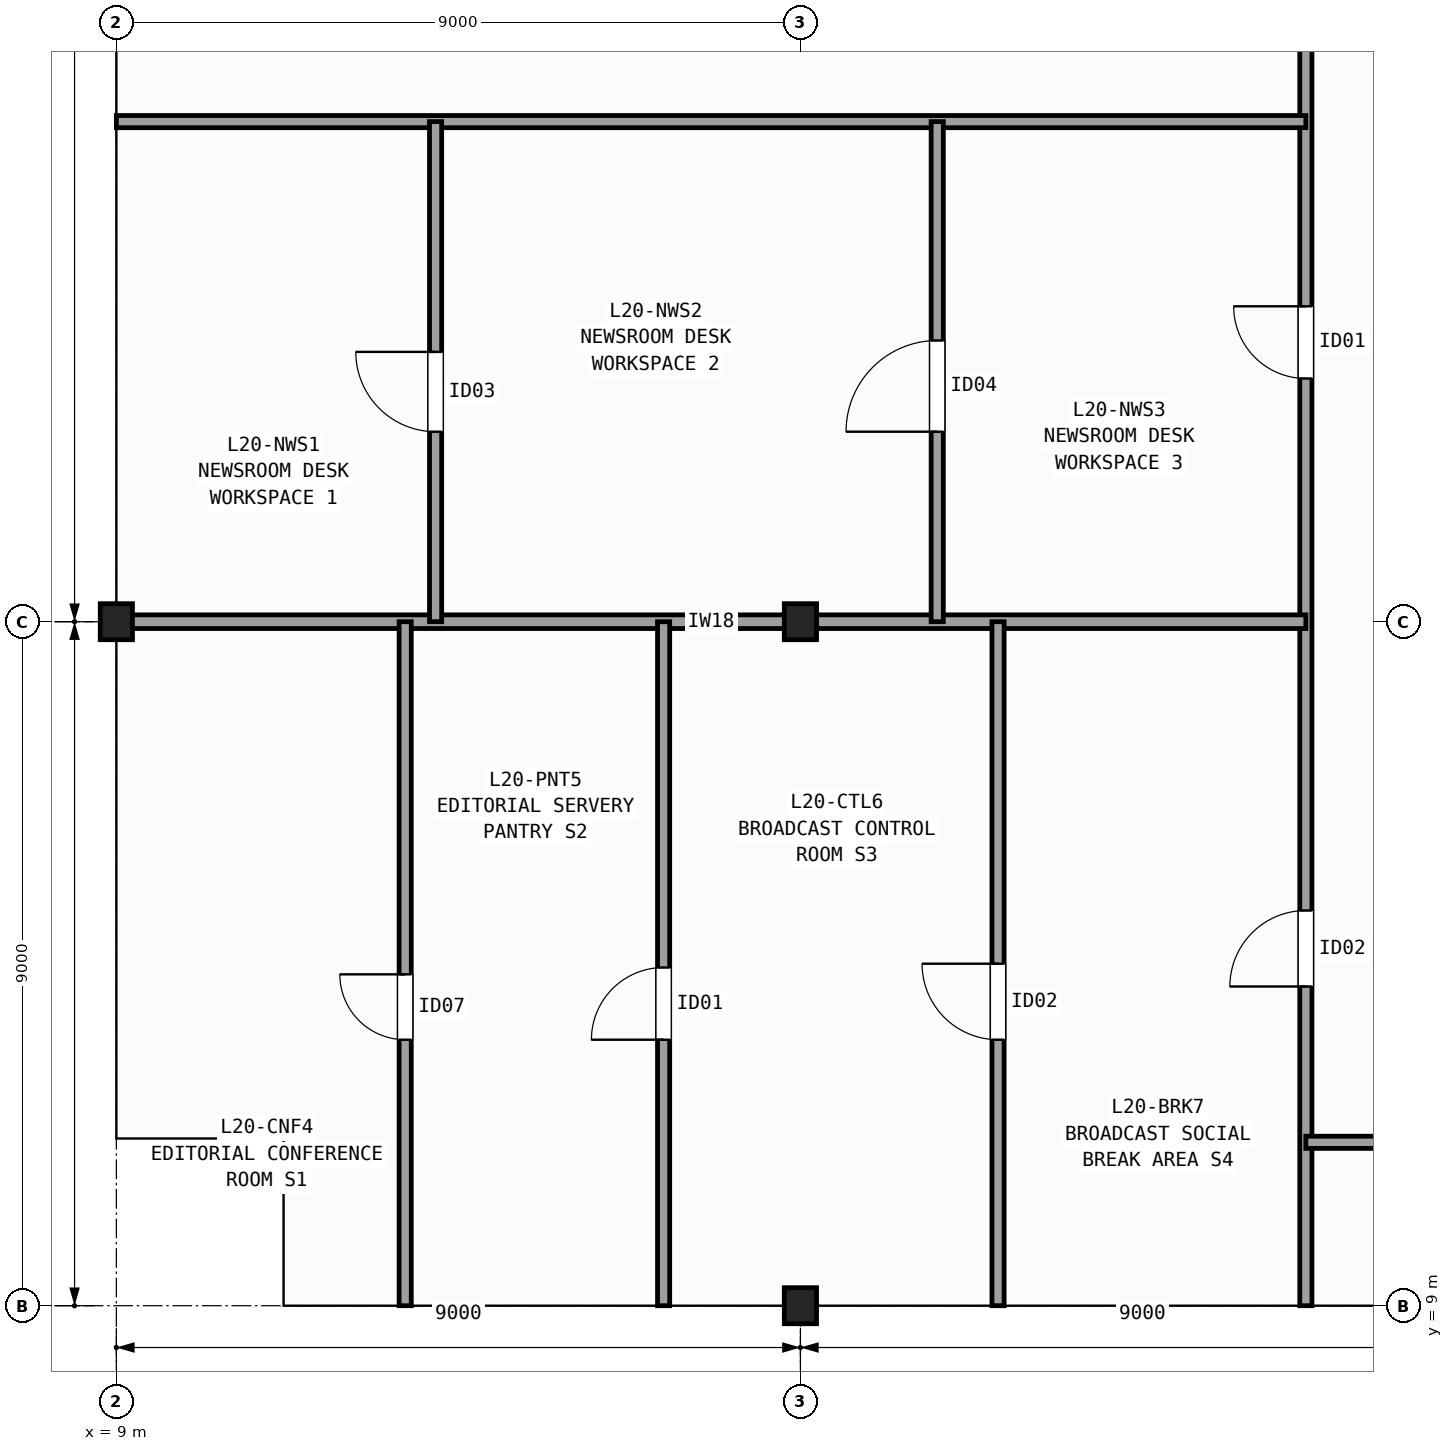
"""IFC4 building model, lengths in metres.
Left out: names, types, materials, properties, quantities, classifications, styles, units other than length and angle.
Written with IfcOpenShell. Run it as: python <this file> out.ifc"""

import sys

from ifc_helpers import new_model, si_unit, direction, frame, frame_2d, origin, origin_2d, place, context, subcontext, project, spatial, rectangle, i_section, extrude, element, fill, save


model = new_model("IFC4")
c1 = context("Model", 3, precision=1e-05, world=origin(), true_north=direction((0.0, 1.0)))
c2 = subcontext(c1, "Body", "Model", "MODEL_VIEW")
j1 = project(units=[si_unit("LENGTHUNIT", "METRE"), si_unit("PLANEANGLEUNIT", "RADIAN")], contexts=[c1])
p1 = place(None, origin())
s1 = spatial("IfcSite", under=j1, at=p1, CompositionType="ELEMENT")
p2 = place(p1, origin())
s2 = spatial("IfcBuilding", under=s1, at=p2, CompositionType="ELEMENT")
p3 = place(p2, frame((0.0, 0.0, 84.1)))
s3 = spatial("IfcBuildingStorey", under=s2, at=p3, CompositionType="ELEMENT", Elevation=84.1)
for number, where, z_axis, x_axis in (
    (1, (9.0, 18.0, 0.0), (0.0, 0.0, 1.0), (1.0, 0.0, 0.0)),
    (2, (18.0, 9.0, 0.0), (0.0, 0.0, 1.0), (1.0, 0.0, 0.0)),
    (3, (18.0, 18.0, 0.0), (0.0, 0.0, 1.0), (1.0, 0.0, 0.0)),
):
    element("IfcColumn", number, at=place(p3, frame(where, z_axis=z_axis, x_axis=x_axis)), inside=s3, PredefinedType="COLUMN", context=c2, shape_type="SweptSolid", body=[
        extrude(i_section(OverallWidth=0.424, OverallDepth=0.474, WebThickness=0.048, FlangeThickness=0.077, FilletRadius=0.015, at=origin_2d()), origin(), (0.0, 0.0, 1.0), 5.0),
    ])
p4 = place(p3, frame((24.65, 9.0, 0.0), z_axis=(0.0, 0.0, 1.0), x_axis=(0.0, 1.0, 0.0)))
e4 = element("IfcWall", 4, at=p4, inside=s3, PredefinedType="PARTITIONING", context=c2, shape_type="SweptSolid", body=[
    extrude(rectangle(XDim=19.2, YDim=0.16, at=frame_2d((9.6, 0.0))), origin(), (0.0, 0.0, 1.0), 3.927),
])
p5 = place(p4, frame((12.2, 0.0, 0.0)))
e5 = element("IfcOpeningElement", 5, at=p5, cuts=e4, PredefinedType="OPENING", context=c2, shape_type="SweptSolid", body=[
    extrude(rectangle(XDim=0.95, YDim=2.1, at=frame_2d((0.475, 1.05))), frame((0.0, 0.09, 0.0), z_axis=(0.0, -1.0, 0.0), x_axis=(1.0, 0.0, 0.0)), (0.0, 0.0, 1.0), 0.18),
])
p6 = place(p4, frame((4.2, 0.0, 0.0)))
e6 = element("IfcOpeningElement", 6, at=p6, cuts=e4, PredefinedType="OPENING", context=c2, shape_type="SweptSolid", body=[
    extrude(rectangle(XDim=1.0, YDim=2.1, at=frame_2d((0.5, 1.05))), frame((0.0, 0.09, 0.0), z_axis=(0.0, -1.0, 0.0), x_axis=(1.0, 0.0, 0.0)), (0.0, 0.0, 1.0), 0.18),
])
p7 = place(p3, frame((9.0, 24.58, 0.0), z_axis=(0.0, 0.0, 1.0), x_axis=(1.0, 0.0, 0.0)))
e7 = element("IfcWall", 7, at=p7, inside=s3, PredefinedType="PARTITIONING", context=c2, shape_type="SweptSolid", body=[
    extrude(rectangle(XDim=15.65, YDim=0.16, at=frame_2d((7.825, 0.0))), origin(), (0.0, 0.0, 1.0), 3.927),
])
p8 = place(p3, frame((9.0, 18.0, 0.0), z_axis=(0.0, 0.0, 1.0), x_axis=(1.0, 0.0, 0.0)))
e8 = element("IfcWall", 8, at=p8, inside=s3, PredefinedType="PARTITIONING", context=c2, shape_type="SweptSolid", body=[
    extrude(rectangle(XDim=15.65, YDim=0.18, at=frame_2d((7.825, 0.0))), origin(), (0.0, 0.0, 1.0), 3.927),
])
p9 = place(p3, frame((13.2, 18.0, 0.0), z_axis=(0.0, 0.0, 1.0), x_axis=(0.0, 1.0, 0.0)))
e9 = element("IfcWall", 9, at=p9, inside=s3, PredefinedType="PARTITIONING", context=c2, shape_type="SweptSolid", body=[
    extrude(rectangle(XDim=6.58, YDim=0.16, at=frame_2d((3.29, 0.0))), origin(), (0.0, 0.0, 1.0), 4.089),
])
p10 = place(p9, frame((2.5, 0.0, 0.0)))
e10 = element("IfcOpeningElement", 10, at=p10, cuts=e9, PredefinedType="OPENING", context=c2, shape_type="SweptSolid", body=[
    extrude(rectangle(XDim=1.05, YDim=2.15, at=frame_2d((0.525, 1.075))), frame((0.0, 0.09, 0.0), z_axis=(0.0, -1.0, 0.0), x_axis=(1.0, 0.0, 0.0)), (0.0, 0.0, 1.0), 0.18),
])
p11 = place(p3, frame((19.8, 18.0, 0.0), z_axis=(0.0, 0.0, 1.0), x_axis=(0.0, 1.0, 0.0)))
e11 = element("IfcWall", 11, at=p11, inside=s3, PredefinedType="PARTITIONING", context=c2, shape_type="SweptSolid", body=[
    extrude(rectangle(XDim=6.58, YDim=0.16, at=frame_2d((3.29, 0.0))), origin(), (0.0, 0.0, 1.0), 4.089),
])
p12 = place(p11, frame((2.5, 0.0, 0.0)))
e12 = element("IfcOpeningElement", 12, at=p12, cuts=e11, PredefinedType="OPENING", context=c2, shape_type="SweptSolid", body=[
    extrude(rectangle(XDim=1.2, YDim=2.15, at=frame_2d((0.6, 1.075))), frame((0.0, 0.09, 0.0), z_axis=(0.0, -1.0, 0.0), x_axis=(1.0, 0.0, 0.0)), (0.0, 0.0, 1.0), 0.18),
])
p13 = place(p3, frame((12.8, 9.0, 0.0), z_axis=(0.0, 0.0, 1.0), x_axis=(0.0, 1.0, 0.0)))
e13 = element("IfcWall", 13, at=p13, inside=s3, PredefinedType="PARTITIONING", context=c2, shape_type="SweptSolid", body=[
    extrude(rectangle(XDim=9.0, YDim=0.16, at=frame_2d((4.5, 0.0))), origin(), (0.0, 0.0, 1.0), 4.089),
])
p14 = place(p13, frame((3.5, 0.0, 0.0)))
e14 = element("IfcOpeningElement", 14, at=p14, cuts=e13, PredefinedType="OPENING", context=c2, shape_type="SweptSolid", body=[
    extrude(rectangle(XDim=0.86, YDim=2.05, at=frame_2d((0.43, 1.025))), frame((0.0, 0.09, 0.0), z_axis=(0.0, -1.0, 0.0), x_axis=(1.0, 0.0, 0.0)), (0.0, 0.0, 1.0), 0.18),
])
p15 = place(p3, frame((16.2, 9.0, 0.0), z_axis=(0.0, 0.0, 1.0), x_axis=(0.0, 1.0, 0.0)))
e15 = element("IfcWall", 15, at=p15, inside=s3, PredefinedType="PARTITIONING", context=c2, shape_type="SweptSolid", body=[
    extrude(rectangle(XDim=9.0, YDim=0.16, at=frame_2d((4.5, 0.0))), origin(), (0.0, 0.0, 1.0), 4.089),
])
p16 = place(p15, frame((3.5, 0.0, 0.0)))
e16 = element("IfcOpeningElement", 16, at=p16, cuts=e15, PredefinedType="OPENING", context=c2, shape_type="SweptSolid", body=[
    extrude(rectangle(XDim=0.95, YDim=2.1, at=frame_2d((0.475, 1.05))), frame((0.0, 0.09, 0.0), z_axis=(0.0, -1.0, 0.0), x_axis=(1.0, 0.0, 0.0)), (0.0, 0.0, 1.0), 0.18),
])
p17 = place(p3, frame((20.6, 9.0, 0.0), z_axis=(0.0, 0.0, 1.0), x_axis=(0.0, 1.0, 0.0)))
e17 = element("IfcWall", 17, at=p17, inside=s3, PredefinedType="PARTITIONING", context=c2, shape_type="SweptSolid", body=[
    extrude(rectangle(XDim=9.0, YDim=0.16, at=frame_2d((4.5, 0.0))), origin(), (0.0, 0.0, 1.0), 3.927),
])
p18 = place(p17, frame((3.5, 0.0, 0.0)))
e18 = element("IfcOpeningElement", 18, at=p18, cuts=e17, PredefinedType="OPENING", context=c2, shape_type="SweptSolid", body=[
    extrude(rectangle(XDim=1.0, YDim=2.1, at=frame_2d((0.5, 1.05))), frame((0.0, 0.09, 0.0), z_axis=(0.0, -1.0, 0.0), x_axis=(1.0, 0.0, 0.0)), (0.0, 0.0, 1.0), 0.18),
])
p19 = place(p3, frame((24.65, 11.15, 0.0), z_axis=(0.0, 0.0, 1.0), x_axis=(1.0, 0.0, 0.0)))
e19 = element("IfcWall", 19, at=p19, inside=s3, PredefinedType="PARTITIONING", context=c2, shape_type="SweptSolid", body=[
    extrude(rectangle(XDim=4.75, YDim=0.16, at=frame_2d((2.375, 0.0))), origin(), (0.0, 0.0, 1.0), 4.092),
])
p20 = place(p19, frame((1.2, 0.0, 0.0)))
e20 = element("IfcOpeningElement", 20, at=p20, cuts=e19, PredefinedType="OPENING", context=c2, shape_type="SweptSolid", body=[
    extrude(rectangle(XDim=0.95, YDim=2.1, at=frame_2d((0.475, 1.05))), frame((0.0, 0.09, 0.0), z_axis=(0.0, -1.0, 0.0), x_axis=(1.0, 0.0, 0.0)), (0.0, 0.0, 1.0), 0.18),
])
p21 = place(p5, origin())
e21 = element("IfcDoor", 21, at=p21, inside=s3, OperationType="SINGLE_SWING_RIGHT", PredefinedType="DOOR", context=c2, shape_type="SweptSolid", body=[
    extrude(rectangle(XDim=0.95, YDim=2.1, at=frame_2d((0.475, 1.05))), frame((0.0, 0.025, 0.0), z_axis=(0.0, -1.0, 0.0), x_axis=(1.0, 0.0, 0.0)), (0.0, 0.0, 1.0), 0.05),
])
fill(e5, e21)
p22 = place(p6, origin())
e22 = element("IfcDoor", 22, at=p22, inside=s3, OperationType="SINGLE_SWING_LEFT", PredefinedType="DOOR", context=c2, shape_type="SweptSolid", body=[
    extrude(rectangle(XDim=1.0, YDim=2.1, at=frame_2d((0.5, 1.05))), frame((0.0, 0.025, 0.0), z_axis=(0.0, -1.0, 0.0), x_axis=(1.0, 0.0, 0.0)), (0.0, 0.0, 1.0), 0.05),
])
fill(e6, e22)
p23 = place(p10, origin())
e23 = element("IfcDoor", 23, at=p23, inside=s3, OperationType="SINGLE_SWING_RIGHT", PredefinedType="DOOR", context=c2, shape_type="SweptSolid", body=[
    extrude(rectangle(XDim=1.05, YDim=2.15, at=frame_2d((0.525, 1.075))), frame((0.0, 0.025, 0.0), z_axis=(0.0, -1.0, 0.0), x_axis=(1.0, 0.0, 0.0)), (0.0, 0.0, 1.0), 0.05),
])
fill(e10, e23)
p24 = place(p12, origin())
e24 = element("IfcDoor", 24, at=p24, inside=s3, OperationType="SINGLE_SWING_LEFT", PredefinedType="DOOR", context=c2, shape_type="SweptSolid", body=[
    extrude(rectangle(XDim=1.2, YDim=2.15, at=frame_2d((0.6, 1.075))), frame((0.0, 0.025, 0.0), z_axis=(0.0, -1.0, 0.0), x_axis=(1.0, 0.0, 0.0)), (0.0, 0.0, 1.0), 0.05),
])
fill(e12, e24)
p25 = place(p14, origin())
e25 = element("IfcDoor", 25, at=p25, inside=s3, OperationType="SINGLE_SWING_RIGHT", PredefinedType="DOOR", context=c2, shape_type="SweptSolid", body=[
    extrude(rectangle(XDim=0.86, YDim=2.05, at=frame_2d((0.43, 1.025))), frame((0.0, 0.025, 0.0), z_axis=(0.0, -1.0, 0.0), x_axis=(1.0, 0.0, 0.0)), (0.0, 0.0, 1.0), 0.05),
])
fill(e14, e25)
p26 = place(p16, origin())
e26 = element("IfcDoor", 26, at=p26, inside=s3, OperationType="SINGLE_SWING_LEFT", PredefinedType="DOOR", context=c2, shape_type="SweptSolid", body=[
    extrude(rectangle(XDim=0.95, YDim=2.1, at=frame_2d((0.475, 1.05))), frame((0.0, 0.025, 0.0), z_axis=(0.0, -1.0, 0.0), x_axis=(1.0, 0.0, 0.0)), (0.0, 0.0, 1.0), 0.05),
])
fill(e16, e26)
p27 = place(p18, origin())
e27 = element("IfcDoor", 27, at=p27, inside=s3, OperationType="SINGLE_SWING_RIGHT", PredefinedType="DOOR", context=c2, shape_type="SweptSolid", body=[
    extrude(rectangle(XDim=1.0, YDim=2.1, at=frame_2d((0.5, 1.05))), frame((0.0, 0.025, 0.0), z_axis=(0.0, -1.0, 0.0), x_axis=(1.0, 0.0, 0.0)), (0.0, 0.0, 1.0), 0.05),
])
fill(e18, e27)
save(model, sys.argv[1])
